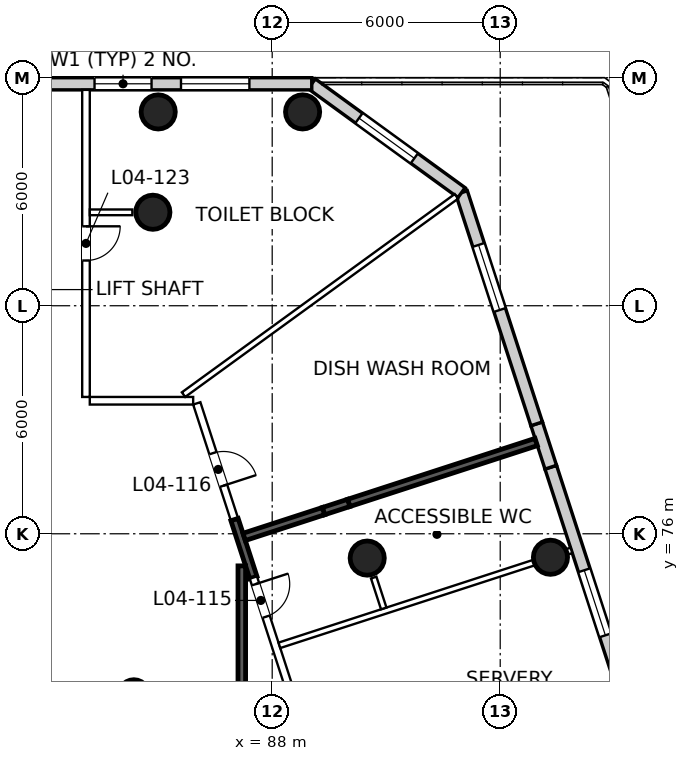
"""IFC4 building model, lengths in metres.
Left out: names, types, materials, properties, quantities, classifications, styles, units other than length and angle.
Written with IfcOpenShell. Run it as: python <this file> out.ifc"""

import sys

from ifc_helpers import new_model, si_unit, direction, frame, frame_2d, origin, origin_2d, place, context, subcontext, project, spatial, rectangle, circle, extrude, element, fill, save


model = new_model("IFC4")
c1 = context("Model", 3, precision=1e-05, world=origin(), true_north=direction((0.0, 1.0)))
c2 = subcontext(c1, "Body", "Model", "MODEL_VIEW")
j1 = project(units=[si_unit("LENGTHUNIT", "METRE"), si_unit("PLANEANGLEUNIT", "RADIAN")], contexts=[c1])
p1 = place(None, origin())
s1 = spatial("IfcSite", under=j1, at=p1, CompositionType="ELEMENT")
p2 = place(p1, origin())
s2 = spatial("IfcBuilding", under=s1, at=p2, CompositionType="ELEMENT")
p3 = place(p2, frame((0.0, 0.0, 29.0)))
s3 = spatial("IfcBuildingStorey", under=s2, at=p3, CompositionType="ELEMENT", Elevation=29.0)
for number, where, z_axis, x_axis in (
    (1, (90.5, 75.36, 0.0), (0.0, 0.0, 1.0), (1.0, 0.0, 0.0)),
    (2, (84.86, 84.46, 0.0), (0.0, 0.0, 1.0), (1.0, 0.0, 0.0)),
):
    element("IfcColumn", number, at=place(p3, frame(where, z_axis=z_axis, x_axis=x_axis)), inside=s3, PredefinedType="COLUMN", context=c2, shape_type="SweptSolid", body=[
        extrude(circle(Radius=0.45, at=origin_2d()), origin(), (0.0, 0.0, 1.0), 5.0),
    ])
p4 = place(p3, frame((84.36, 71.76, 0.0), z_axis=(0.0, 0.0, 1.0), x_axis=(1.0, 0.0, 0.0)))
e3 = element("IfcColumn", 3, at=p4, inside=s3, PredefinedType="COLUMN", context=c2, shape_type="SweptSolid", body=[
    extrude(circle(Radius=0.4, at=origin_2d()), origin(), (0.0, 0.0, 1.0), 5.0),
])
for number, where, z_axis, x_axis in (
    (4, (95.322, 75.382, 0.0), (0.0, 0.0, 1.0), (1.0, 0.0, 0.0)),
    (5, (88.8, 87.1, 0.0), (0.0, 0.0, 1.0), (1.0, 0.0, 0.0)),
    (6, (85.0, 87.1, 0.0), (0.0, 0.0, 1.0), (1.0, 0.0, 0.0)),
):
    element("IfcColumn", number, at=place(p3, frame(where, z_axis=z_axis, x_axis=x_axis)), inside=s3, PredefinedType="COLUMN", context=c2, shape_type="SweptSolid", body=[
        extrude(circle(Radius=0.45, at=origin_2d()), origin(), (0.0, 0.0, 1.0), 5.0),
    ])
p5 = place(p3, frame((100.923, 60.539, 0.0), z_axis=(0.0, 0.0, 1.0), x_axis=(-0.309011034794, 0.95105845266, 0.0)))
e7 = element("IfcWall", 7, at=p5, inside=s3, PredefinedType="SOLIDWALL", context=c2, shape_type="SweptSolid", body=[
    extrude(rectangle(XDim=18.098, YDim=0.32, at=frame_2d((9.049, 0.0))), origin(), (0.0, 0.0, 1.0), 4.65),
])
p6 = place(p5, frame((1.447, 0.0, 0.9)))
e8 = element("IfcOpeningElement", 8, at=p6, cuts=e7, PredefinedType="OPENING", context=c2, shape_type="SweptSolid", body=[
    extrude(rectangle(XDim=1.8, YDim=2.1, at=frame_2d((0.9, 1.05))), frame((0.0, 0.17, 0.0), z_axis=(0.0, -1.0, 0.0), x_axis=(1.0, 0.0, 0.0)), (0.0, 0.0, 1.0), 0.34),
])
p7 = place(p5, frame((4.447, 0.0, 0.9)))
e9 = element("IfcOpeningElement", 9, at=p7, cuts=e7, PredefinedType="OPENING", context=c2, shape_type="SweptSolid", body=[
    extrude(rectangle(XDim=1.8, YDim=2.1, at=frame_2d((0.9, 1.05))), frame((0.0, 0.17, 0.0), z_axis=(0.0, -1.0, 0.0), x_axis=(1.0, 0.0, 0.0)), (0.0, 0.0, 1.0), 0.34),
])
p8 = place(p5, frame((7.447, 0.0, 0.9)))
e10 = element("IfcOpeningElement", 10, at=p8, cuts=e7, PredefinedType="OPENING", context=c2, shape_type="SweptSolid", body=[
    extrude(rectangle(XDim=1.8, YDim=2.1, at=frame_2d((0.9, 1.05))), frame((0.0, 0.17, 0.0), z_axis=(0.0, -1.0, 0.0), x_axis=(1.0, 0.0, 0.0)), (0.0, 0.0, 1.0), 0.34),
])
p9 = place(p5, frame((10.447, 0.0, 0.9)))
e11 = element("IfcOpeningElement", 11, at=p9, cuts=e7, PredefinedType="OPENING", context=c2, shape_type="SweptSolid", body=[
    extrude(rectangle(XDim=1.8, YDim=2.1, at=frame_2d((0.9, 1.05))), frame((0.0, 0.17, 0.0), z_axis=(0.0, -1.0, 0.0), x_axis=(1.0, 0.0, 0.0)), (0.0, 0.0, 1.0), 0.34),
])
p10 = place(p5, frame((13.447, 0.0, 0.9)))
e12 = element("IfcOpeningElement", 12, at=p10, cuts=e7, PredefinedType="OPENING", context=c2, shape_type="SweptSolid", body=[
    extrude(rectangle(XDim=1.8, YDim=2.1, at=frame_2d((0.9, 1.05))), frame((0.0, 0.17, 0.0), z_axis=(0.0, -1.0, 0.0), x_axis=(1.0, 0.0, 0.0)), (0.0, 0.0, 1.0), 0.34),
])
p11 = place(p3, frame((95.33, 77.751, 0.0), z_axis=(0.0, 0.0, 1.0), x_axis=(-0.309076870563, 0.951037059258, 0.0)))
e13 = element("IfcWall", 13, at=p11, inside=s3, PredefinedType="SOLIDWALL", context=c2, shape_type="SweptSolid", body=[
    extrude(rectangle(XDim=1.2, YDim=0.32, at=frame_2d((0.6, 0.0))), origin(), (0.0, 0.0, 1.0), 4.65),
])
p12 = place(p3, frame((94.959, 78.893, 0.0), z_axis=(0.0, 0.0, 1.0), x_axis=(-0.309016163342, 0.951056786314, 0.0)))
e14 = element("IfcWall", 14, at=p12, inside=s3, PredefinedType="SOLIDWALL", context=c2, shape_type="SweptSolid", body=[
    extrude(rectangle(XDim=6.396, YDim=0.32, at=frame_2d((3.198, 0.0))), origin(), (0.0, 0.0, 1.0), 4.65),
])
p13 = place(p12, frame((3.149, 0.0, 0.9)))
e15 = element("IfcOpeningElement", 15, at=p13, cuts=e14, PredefinedType="OPENING", context=c2, shape_type="SweptSolid", body=[
    extrude(rectangle(XDim=1.8, YDim=2.1, at=frame_2d((0.9, 1.05))), frame((0.0, 0.17, 0.0), z_axis=(0.0, -1.0, 0.0), x_axis=(1.0, 0.0, 0.0)), (0.0, 0.0, 1.0), 0.34),
])
p14 = place(p3, frame((92.983, 84.976, 0.0), z_axis=(0.0, 0.0, 1.0), x_axis=(-0.809004657531, 0.587802232127, 0.0)))
e16 = element("IfcWall", 16, at=p14, inside=s3, PredefinedType="SOLIDWALL", context=c2, shape_type="SweptSolid", body=[
    extrude(rectangle(XDim=4.873, YDim=0.32, at=frame_2d((2.437, 0.0))), origin(), (0.0, 0.0, 1.0), 4.65),
])
p15 = place(p14, frame((1.536, 0.0, 0.9)))
e17 = element("IfcOpeningElement", 17, at=p15, cuts=e16, PredefinedType="OPENING", context=c2, shape_type="SweptSolid", body=[
    extrude(rectangle(XDim=1.8, YDim=2.1, at=frame_2d((0.9, 1.05))), frame((0.0, 0.17, 0.0), z_axis=(0.0, -1.0, 0.0), x_axis=(1.0, 0.0, 0.0)), (0.0, 0.0, 1.0), 0.34),
])
p16 = place(p3, frame((89.041, 87.84, 0.0), z_axis=(0.0, 0.0, 1.0), x_axis=(-1.0, 0.0, 0.0)))
e18 = element("IfcWall", 18, at=p16, inside=s3, PredefinedType="SOLIDWALL", context=c2, shape_type="SweptSolid", body=[
    extrude(rectangle(XDim=8.041, YDim=0.32, at=frame_2d((4.021, 0.0))), origin(), (0.0, 0.0, 1.0), 4.65),
])
p17 = place(p16, frame((1.641, 0.0, 0.9)))
e19 = element("IfcOpeningElement", 19, at=p17, cuts=e18, PredefinedType="OPENING", context=c2, shape_type="SweptSolid", body=[
    extrude(rectangle(XDim=1.8, YDim=2.1, at=frame_2d((0.9, 1.05))), frame((0.0, 0.17, 0.0), z_axis=(0.0, -1.0, 0.0), x_axis=(1.0, 0.0, 0.0)), (0.0, 0.0, 1.0), 0.34),
])
p18 = place(p16, frame((4.216, 0.0, 0.9)))
e20 = element("IfcOpeningElement", 20, at=p18, cuts=e18, PredefinedType="OPENING", context=c2, shape_type="SweptSolid", body=[
    extrude(rectangle(XDim=1.5, YDim=1.8, at=frame_2d((0.75, 0.9))), frame((0.0, 0.17, 0.0), z_axis=(0.0, -1.0, 0.0), x_axis=(1.0, 0.0, 0.0)), (0.0, 0.0, 1.0), 0.34),
])
p19 = place(p3, frame((83.1, 87.68, 0.0), z_axis=(0.0, 0.0, 1.0), x_axis=(0.0, -1.0, 0.0)))
e21 = element("IfcWall", 21, at=p19, inside=s3, PredefinedType="PARTITIONING", context=c2, shape_type="SweptSolid", body=[
    extrude(rectangle(XDim=8.08, YDim=0.2, at=frame_2d((4.04, 0.0))), origin(), (0.0, 0.0, 1.0), 3.95),
])
p20 = place(p19, frame((3.59, 0.0, 0.0)))
e22 = element("IfcOpeningElement", 22, at=p20, cuts=e21, PredefinedType="OPENING", context=c2, shape_type="SweptSolid", body=[
    extrude(rectangle(XDim=0.9, YDim=2.1, at=frame_2d((0.45, 1.05))), frame((0.0, 0.11, 0.0), z_axis=(0.0, -1.0, 0.0), x_axis=(1.0, 0.0, 0.0)), (0.0, 0.0, 1.0), 0.22),
])
p21 = place(p3, frame((83.2, 79.5, 0.0), z_axis=(0.0, 0.0, 1.0), x_axis=(1.0, 0.0, 0.0)))
e23 = element("IfcWall", 23, at=p21, inside=s3, PredefinedType="PARTITIONING", context=c2, shape_type="SweptSolid", body=[
    extrude(rectangle(XDim=2.72, YDim=0.2, at=frame_2d((1.36, 0.0))), origin(), (0.0, 0.0, 1.0), 4.65),
])
p22 = place(p3, frame((86.015, 79.431, 0.0), z_axis=(0.0, 0.0, 1.0), x_axis=(0.309041420656, -0.951048579369, 0.0)))
e24 = element("IfcWall", 24, at=p22, inside=s3, PredefinedType="PARTITIONING", context=c2, shape_type="SweptSolid", body=[
    extrude(rectangle(XDim=3.215, YDim=0.2, at=frame_2d((1.607, 0.0))), origin(), (0.0, 0.0, 1.0), 4.65),
])
p23 = place(p22, frame((1.377, 0.0, 0.0)))
e25 = element("IfcOpeningElement", 25, at=p23, cuts=e24, PredefinedType="OPENING", context=c2, shape_type="SweptSolid", body=[
    extrude(rectangle(XDim=0.9, YDim=2.1, at=frame_2d((0.45, 1.05))), frame((0.0, 0.11, 0.0), z_axis=(0.0, -1.0, 0.0), x_axis=(1.0, 0.0, 0.0)), (0.0, 0.0, 1.0), 0.22),
])
p24 = place(p3, frame((87.009, 76.374, 0.0), z_axis=(0.0, 0.0, 1.0), x_axis=(0.308958737343, -0.95107544318, 0.0)))
e26 = element("IfcWall", 26, at=p24, inside=s3, PredefinedType="PARTITIONING", context=c2, shape_type="SweptSolid", body=[
    extrude(rectangle(XDim=1.604, YDim=0.2, at=frame_2d((0.802, 0.0))), origin(), (0.0, 0.0, 1.0), 4.65),
])
p25 = place(p3, frame((87.504, 74.848, 0.0), z_axis=(0.0, 0.0, 1.0), x_axis=(0.309027605618, -0.951053068428, 0.0)))
e27 = element("IfcWall", 27, at=p25, inside=s3, PredefinedType="PARTITIONING", context=c2, shape_type="SweptSolid", body=[
    extrude(rectangle(XDim=15.013, YDim=0.2, at=frame_2d((7.506, 0.0))), origin(), (0.0, 0.0, 1.0), 4.65),
])
p26 = place(p25, frame((12.527, 0.0, 0.0)))
e28 = element("IfcOpeningElement", 28, at=p26, cuts=e27, PredefinedType="OPENING", context=c2, shape_type="SweptSolid", body=[
    extrude(rectangle(XDim=0.9, YDim=2.1, at=frame_2d((0.45, 1.05))), frame((0.0, 0.11, 0.0), z_axis=(0.0, -1.0, 0.0), x_axis=(1.0, 0.0, 0.0)), (0.0, 0.0, 1.0), 0.22),
])
p27 = place(p25, frame((8.958, 0.0, 0.0)))
e29 = element("IfcOpeningElement", 29, at=p27, cuts=e27, PredefinedType="OPENING", context=c2, shape_type="SweptSolid", body=[
    extrude(rectangle(XDim=0.9, YDim=2.1, at=frame_2d((0.45, 1.05))), frame((0.0, 0.11, 0.0), z_axis=(0.0, -1.0, 0.0), x_axis=(1.0, 0.0, 0.0)), (0.0, 0.0, 1.0), 0.22),
])
p28 = place(p25, frame((4.458, 0.0, 0.0)))
e30 = element("IfcOpeningElement", 30, at=p28, cuts=e27, PredefinedType="OPENING", context=c2, shape_type="SweptSolid", body=[
    extrude(rectangle(XDim=0.9, YDim=2.1, at=frame_2d((0.45, 1.05))), frame((0.0, 0.11, 0.0), z_axis=(0.0, -1.0, 0.0), x_axis=(1.0, 0.0, 0.0)), (0.0, 0.0, 1.0), 0.22),
])
p29 = place(p25, frame((0.183, 0.0, 0.0)))
e31 = element("IfcOpeningElement", 31, at=p29, cuts=e27, PredefinedType="OPENING", context=c2, shape_type="SweptSolid", body=[
    extrude(rectangle(XDim=0.9, YDim=2.1, at=frame_2d((0.45, 1.05))), frame((0.0, 0.11, 0.0), z_axis=(0.0, -1.0, 0.0), x_axis=(1.0, 0.0, 0.0)), (0.0, 0.0, 1.0), 0.22),
])
p30 = place(p3, frame((92.847, 84.877, 0.0), z_axis=(0.0, 0.0, 1.0), x_axis=(-0.809019122312, -0.587782323427, 0.0)))
e32 = element("IfcWall", 32, at=p30, inside=s3, PredefinedType="PARTITIONING", context=c2, shape_type="SweptSolid", body=[
    extrude(rectangle(XDim=8.875, YDim=0.15, at=frame_2d((4.437, 0.0))), origin(), (0.0, 0.0, 1.0), 3.75),
])
p31 = place(p3, frame((95.874, 75.561, 0.0), z_axis=(0.0, 0.0, 1.0), x_axis=(-0.951058046839, -0.309012283804, 0.0)))
e33 = element("IfcWall", 33, at=p31, inside=s3, PredefinedType="PARTITIONING", context=c2, shape_type="SweptSolid", body=[
    extrude(rectangle(XDim=8.08, YDim=0.15, at=frame_2d((4.04, 0.0))), origin(), (0.0, 0.0, 1.0), 3.95),
])
p32 = place(p3, frame((94.947, 78.414, 0.0), z_axis=(0.0, 0.0, 1.0), x_axis=(-0.951065538784, -0.308989224631, 0.0)))
e34 = element("IfcWall", 34, at=p32, inside=s3, PredefinedType="PARTITIONING", context=c2, shape_type="SweptSolid", body=[
    extrude(rectangle(XDim=5.187, YDim=0.2, at=frame_2d((2.594, 0.0))), origin(), (0.0, 0.0, 1.0), 4.65),
])
p33 = place(p3, frame((90.013, 76.812, 0.0), z_axis=(0.0, 0.0, 1.0), x_axis=(-0.951067455121, -0.308983326103, 0.0)))
e35 = element("IfcWall", 35, at=p33, inside=s3, PredefinedType="PARTITIONING", context=c2, shape_type="SweptSolid", body=[
    extrude(rectangle(XDim=0.698, YDim=0.2, at=frame_2d((0.349, 0.0))), origin(), (0.0, 0.0, 1.0), 3.75),
])
p34 = place(p3, frame((89.349, 76.596, 0.0), z_axis=(0.0, 0.0, 1.0), x_axis=(-0.951037339136, -0.309076009373, 0.0)))
e36 = element("IfcWall", 36, at=p34, inside=s3, PredefinedType="PARTITIONING", context=c2, shape_type="SweptSolid", body=[
    extrude(rectangle(XDim=2.194, YDim=0.2, at=frame_2d((1.097, 0.0))), origin(), (0.0, 0.0, 1.0), 4.65),
])
p35 = place(p3, frame((87.2, 75.155, 0.0), z_axis=(0.0, 0.0, 1.0), x_axis=(0.0, -1.0, 0.0)))
e37 = element("IfcWall", 37, at=p35, inside=s3, PredefinedType="PARTITIONING", context=c2, shape_type="SweptSolid", body=[
    extrude(rectangle(XDim=10.28, YDim=0.2, at=frame_2d((5.14, 0.0))), origin(), (0.0, 0.0, 1.0), 4.65),
])
p36 = place(p35, frame((3.925, 0.0, 0.0)))
e38 = element("IfcOpeningElement", 38, at=p36, cuts=e37, PredefinedType="OPENING", context=c2, shape_type="SweptSolid", body=[
    extrude(rectangle(XDim=1.8, YDim=2.1, at=frame_2d((0.9, 1.05))), frame((0.0, 0.11, 0.0), z_axis=(0.0, -1.0, 0.0), x_axis=(1.0, 0.0, 0.0)), (0.0, 0.0, 1.0), 0.22),
])
p37 = place(p3, frame((90.671, 74.848, 0.0), z_axis=(0.0, 0.0, 1.0), x_axis=(0.30893097988, -0.951084459798, 0.0)))
e39 = element("IfcWall", 39, at=p37, inside=s3, PredefinedType="PARTITIONING", context=c2, shape_type="SweptSolid", body=[
    extrude(rectangle(XDim=0.854, YDim=0.15, at=frame_2d((0.427, 0.0))), origin(), (0.0, 0.0, 1.0), 3.95),
])
p38 = place(p3, frame((84.32, 84.458, 0.0), z_axis=(0.0, 0.0, 1.0), x_axis=(-1.0, 0.0, 0.0)))
e40 = element("IfcWall", 40, at=p38, inside=s3, PredefinedType="PARTITIONING", context=c2, shape_type="SweptSolid", body=[
    extrude(rectangle(XDim=1.12, YDim=0.15, at=frame_2d((0.56, 0.0))), origin(), (0.0, 0.0, 1.0), 3.95),
])
p39 = place(p10, origin())
e41 = element("IfcWindow", 41, at=p39, inside=s3, PartitioningType="SINGLE_PANEL", PredefinedType="WINDOW", context=c2, shape_type="SweptSolid", body=[
    extrude(rectangle(XDim=1.8, YDim=2.1, at=frame_2d((0.9, 1.05))), frame((0.0, 0.07, 0.0), z_axis=(0.0, -1.0, 0.0), x_axis=(1.0, 0.0, 0.0)), (0.0, 0.0, 1.0), 0.06),
])
fill(e12, e41)
p40 = place(p13, origin())
e42 = element("IfcWindow", 42, at=p40, inside=s3, PartitioningType="SINGLE_PANEL", PredefinedType="WINDOW", context=c2, shape_type="SweptSolid", body=[
    extrude(rectangle(XDim=1.8, YDim=2.1, at=frame_2d((0.9, 1.05))), frame((0.0, 0.07, 0.0), z_axis=(0.0, -1.0, 0.0), x_axis=(1.0, 0.0, 0.0)), (0.0, 0.0, 1.0), 0.06),
])
fill(e15, e42)
p41 = place(p15, origin())
e43 = element("IfcWindow", 43, at=p41, inside=s3, PartitioningType="SINGLE_PANEL", PredefinedType="WINDOW", context=c2, shape_type="SweptSolid", body=[
    extrude(rectangle(XDim=1.8, YDim=2.1, at=frame_2d((0.9, 1.05))), frame((0.0, 0.07, 0.0), z_axis=(0.0, -1.0, 0.0), x_axis=(1.0, 0.0, 0.0)), (0.0, 0.0, 1.0), 0.06),
])
fill(e17, e43)
p42 = place(p17, origin())
e44 = element("IfcWindow", 44, at=p42, inside=s3, PartitioningType="SINGLE_PANEL", PredefinedType="WINDOW", context=c2, shape_type="SweptSolid", body=[
    extrude(rectangle(XDim=1.8, YDim=2.1, at=frame_2d((0.9, 1.05))), frame((0.0, 0.07, 0.0), z_axis=(0.0, -1.0, 0.0), x_axis=(1.0, 0.0, 0.0)), (0.0, 0.0, 1.0), 0.06),
])
fill(e19, e44)
p43 = place(p18, origin())
e45 = element("IfcWindow", 45, at=p43, inside=s3, PartitioningType="SINGLE_PANEL", PredefinedType="WINDOW", context=c2, shape_type="SweptSolid", body=[
    extrude(rectangle(XDim=1.5, YDim=1.8, at=frame_2d((0.75, 0.9))), frame((0.0, 0.07, 0.0), z_axis=(0.0, -1.0, 0.0), x_axis=(1.0, 0.0, 0.0)), (0.0, 0.0, 1.0), 0.06),
])
fill(e20, e45)
p44 = place(p29, origin())
e46 = element("IfcDoor", 46, at=p44, inside=s3, OperationType="SINGLE_SWING_LEFT", PredefinedType="DOOR", context=c2, shape_type="SweptSolid", body=[
    extrude(rectangle(XDim=0.9, YDim=2.1, at=frame_2d((0.45, 1.05))), frame((0.0, 0.025, 0.0), z_axis=(0.0, -1.0, 0.0), x_axis=(1.0, 0.0, 0.0)), (0.0, 0.0, 1.0), 0.05),
])
fill(e31, e46)
p45 = place(p23, origin())
e47 = element("IfcDoor", 47, at=p45, inside=s3, OperationType="SINGLE_SWING_RIGHT", PredefinedType="DOOR", context=c2, shape_type="SweptSolid", body=[
    extrude(rectangle(XDim=0.9, YDim=2.1, at=frame_2d((0.45, 1.05))), frame((0.0, 0.025, 0.0), z_axis=(0.0, -1.0, 0.0), x_axis=(1.0, 0.0, 0.0)), (0.0, 0.0, 1.0), 0.05),
])
fill(e25, e47)
p46 = place(p20, origin())
e48 = element("IfcDoor", 48, at=p46, inside=s3, OperationType="SINGLE_SWING_LEFT", PredefinedType="DOOR", context=c2, shape_type="SweptSolid", body=[
    extrude(rectangle(XDim=0.9, YDim=2.1, at=frame_2d((0.45, 1.05))), frame((0.0, 0.025, 0.0), z_axis=(0.0, -1.0, 0.0), x_axis=(1.0, 0.0, 0.0)), (0.0, 0.0, 1.0), 0.05),
])
fill(e22, e48)
save(model, sys.argv[1])
